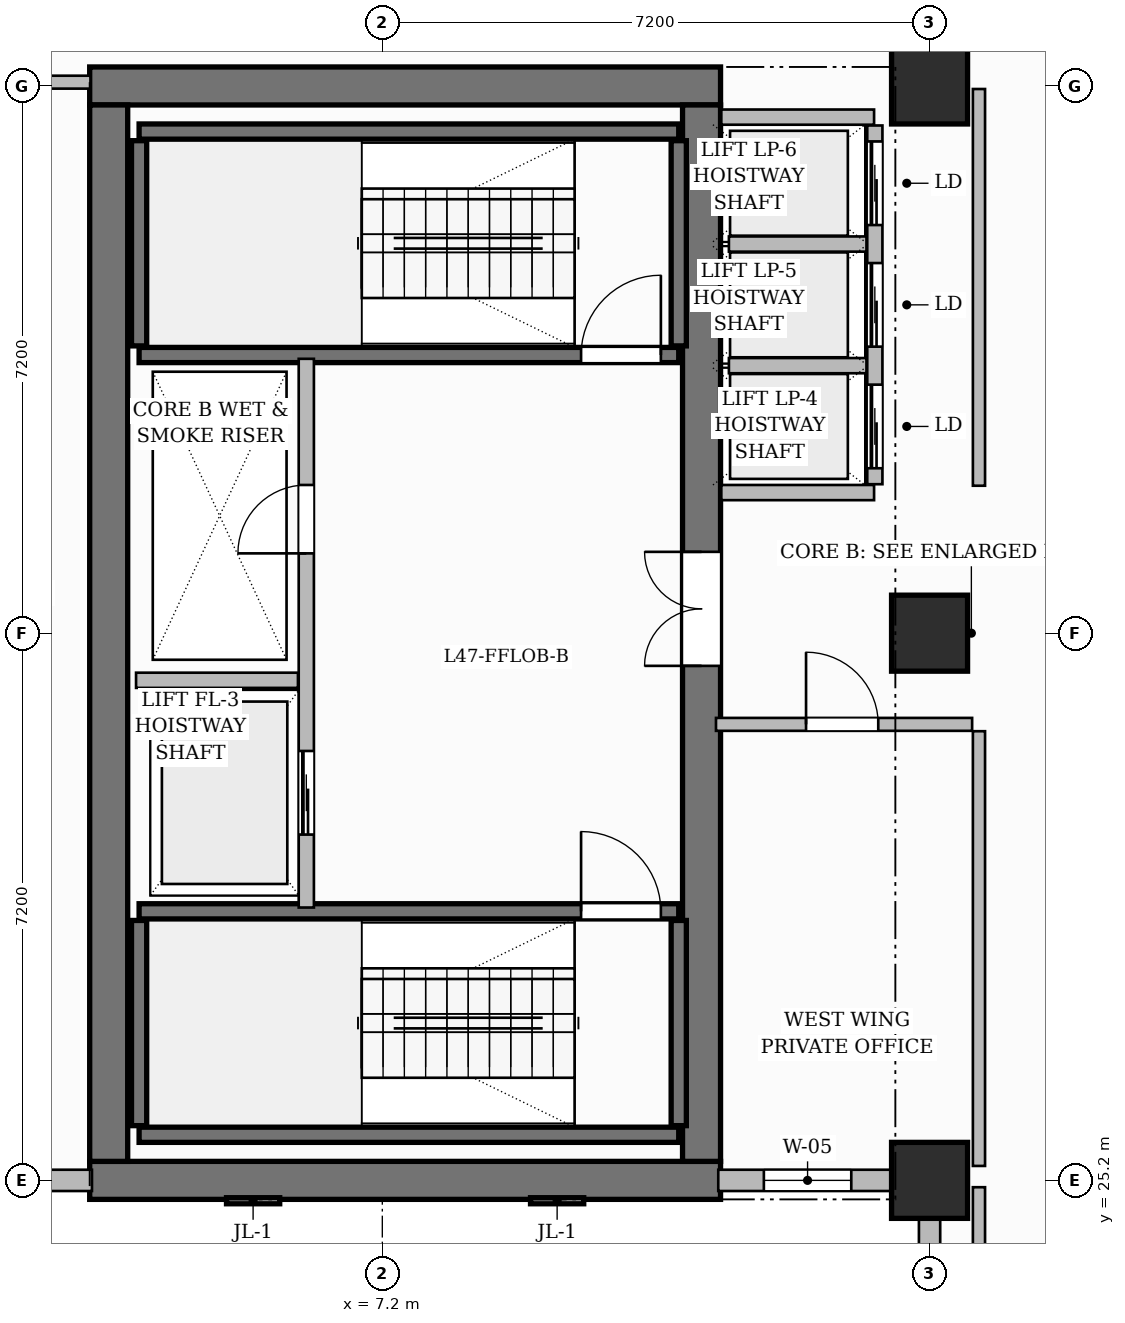
"""IFC4 building model, lengths in metres.
Left out: names, types, materials, properties, quantities, classifications, styles, units other than length and angle.
Written with IfcOpenShell. Run it as: python <this file> out.ifc"""

import sys

from ifc_helpers import new_model, si_unit, direction, frame, frame_2d, origin, origin_2d, place, context, subcontext, project, spatial, rectangle, extrude, source, transform, mapped, element, fill, save


model = new_model("IFC4")
c1 = context("Model", 3, precision=1e-05, world=origin(), true_north=direction((0.0, 1.0)))
c2 = subcontext(c1, "Body", "Model", "MODEL_VIEW")
j1 = project(units=[si_unit("LENGTHUNIT", "METRE"), si_unit("PLANEANGLEUNIT", "RADIAN")], contexts=[c1])
p1 = place(None, origin())
s1 = spatial("IfcSite", under=j1, at=p1, CompositionType="ELEMENT")
p2 = place(p1, origin())
s2 = spatial("IfcBuilding", under=s1, at=p2, CompositionType="ELEMENT")
p3 = place(p2, frame((0.0, 0.0, 188.8)))
s3 = spatial("IfcBuildingStorey", under=s2, at=p3, CompositionType="ELEMENT", Elevation=188.8)
for number, where, z_axis, x_axis in (
    (1, (3.35, 25.2, 0.0), (0.0, 0.0, 1.0), (1.0, 0.0, 0.0)),
    (2, (3.35, 39.6, 0.0), (0.0, 0.0, 1.0), (1.0, 0.0, 0.0)),
):
    element("IfcWall", number, at=place(p3, frame(where, z_axis=z_axis, x_axis=x_axis)), inside=s3, PredefinedType="SHEAR", context=c2, shape_type="SweptSolid", body=[
        extrude(rectangle(XDim=8.3, YDim=0.5, at=frame_2d((4.15, 0.0))), origin(), (0.0, 0.0, 1.0), 3.85),
    ])
p4 = place(p3, frame((3.6, 25.45, 0.0), z_axis=(0.0, 0.0, 1.0), x_axis=(0.0, 1.0, 0.0)))
e3 = element("IfcWall", 3, at=p4, inside=s3, PredefinedType="SHEAR", context=c2, shape_type="SweptSolid", body=[
    extrude(rectangle(XDim=13.9, YDim=0.5, at=frame_2d((6.95, 0.0))), origin(), (0.0, 0.0, 1.0), 3.85),
])
p5 = place(p3, frame((11.4, 25.45, 0.0), z_axis=(0.0, 0.0, 1.0), x_axis=(0.0, 1.0, 0.0)))
e4 = element("IfcWall", 4, at=p5, inside=s3, PredefinedType="SHEAR", context=c2, shape_type="SweptSolid", body=[
    extrude(rectangle(XDim=13.9, YDim=0.5, at=frame_2d((6.95, 0.0))), origin(), (0.0, 0.0, 1.0), 3.85),
])
p6 = place(p5, frame((6.52, 0.0, 0.0)))
e5 = element("IfcOpeningElement", 5, at=p6, cuts=e4, PredefinedType="OPENING", context=c2, shape_type="SweptSolid", body=[
    extrude(rectangle(XDim=1.5, YDim=2.2, at=frame_2d((0.75, 1.1))), frame((0.0, 0.26, 0.0), z_axis=(0.0, -1.0, 0.0), x_axis=(1.0, 0.0, 0.0)), (0.0, 0.0, 1.0), 0.52),
])
m1 = source(origin(), c2, "Body", "SweptSolid", [
    extrude(rectangle(XDim=1.0, YDim=1.0, at=origin_2d()), origin(), (0.0, 0.0, 1.0), 3.85),
])
for number, where, z_axis, x_axis in (
    (6, (14.4, 25.2, 0.0), (0.0, 0.0, 1.0), (1.0, 0.0, 0.0)),
    (7, (14.4, 32.4, 0.0), (0.0, 0.0, 1.0), (1.0, 0.0, 0.0)),
    (8, (14.4, 39.6, 0.0), (0.0, 0.0, 1.0), (1.0, 0.0, 0.0)),
):
    element("IfcColumn", number, at=place(p3, frame(where, z_axis=z_axis, x_axis=x_axis)), inside=s3, PredefinedType="COLUMN", context=c2, shape_type="MappedRepresentation", body=[
        mapped(m1, transform((0.0, 0.0, 0.0), scale=1.0)),
    ])
p7 = place(p3, frame((4.0, 25.8, 0.0), z_axis=(0.0, 0.0, 1.0), x_axis=(1.0, 0.0, 0.0)))
e9 = element("IfcWall", 9, at=p7, inside=s3, PredefinedType="SHEAR", context=c2, shape_type="SweptSolid", body=[
    extrude(rectangle(XDim=7.1, YDim=0.2, at=frame_2d((3.55, 0.0))), origin(), (0.0, 0.0, 1.0), 3.85),
])
for number, where, z_axis, x_axis in (
    (10, (4.0, 25.92, 0.0), (0.0, 0.0, 1.0), (0.0, 1.0, 0.0)),
    (11, (11.1, 25.92, 0.0), (0.0, 0.0, 1.0), (0.0, 1.0, 0.0)),
):
    element("IfcWall", number, at=place(p3, frame(where, z_axis=z_axis, x_axis=x_axis)), inside=s3, PredefinedType="SHEAR", context=c2, shape_type="SweptSolid", body=[
        extrude(rectangle(XDim=2.7, YDim=0.2, at=frame_2d((1.35, 0.0))), origin(), (0.0, 0.0, 1.0), 3.85),
    ])
p8 = place(p3, frame((4.0, 28.74, 0.0), z_axis=(0.0, 0.0, 1.0), x_axis=(1.0, 0.0, 0.0)))
e12 = element("IfcWall", 12, at=p8, inside=s3, PredefinedType="SHEAR", context=c2, shape_type="SweptSolid", body=[
    extrude(rectangle(XDim=7.1, YDim=0.2, at=frame_2d((3.55, 0.0))), origin(), (0.0, 0.0, 1.0), 3.85),
])
p9 = place(p8, frame((5.815, 0.0, 0.0)))
e13 = element("IfcOpeningElement", 13, at=p9, cuts=e12, PredefinedType="OPENING", context=c2, shape_type="SweptSolid", body=[
    extrude(rectangle(XDim=1.05, YDim=2.2, at=frame_2d((0.525, 1.1))), frame((0.0, 0.11, 0.0), z_axis=(0.0, -1.0, 0.0), x_axis=(1.0, 0.0, 0.0)), (0.0, 0.0, 1.0), 0.22),
])
p10 = place(p3, frame((4.0, 39.0, 0.0), z_axis=(0.0, 0.0, 1.0), x_axis=(1.0, 0.0, 0.0)))
e14 = element("IfcWall", 14, at=p10, inside=s3, PredefinedType="SHEAR", context=c2, shape_type="SweptSolid", body=[
    extrude(rectangle(XDim=7.1, YDim=0.2, at=frame_2d((3.55, 0.0))), origin(), (0.0, 0.0, 1.0), 3.85),
])
for number, where, z_axis, x_axis in (
    (15, (4.0, 36.18, 0.0), (0.0, 0.0, 1.0), (0.0, 1.0, 0.0)),
    (16, (11.1, 36.18, 0.0), (0.0, 0.0, 1.0), (0.0, 1.0, 0.0)),
):
    element("IfcWall", number, at=place(p3, frame(where, z_axis=z_axis, x_axis=x_axis)), inside=s3, PredefinedType="SHEAR", context=c2, shape_type="SweptSolid", body=[
        extrude(rectangle(XDim=2.7, YDim=0.2, at=frame_2d((1.35, 0.0))), origin(), (0.0, 0.0, 1.0), 3.85),
    ])
p11 = place(p3, frame((4.0, 36.06, 0.0), z_axis=(0.0, 0.0, 1.0), x_axis=(1.0, 0.0, 0.0)))
e17 = element("IfcWall", 17, at=p11, inside=s3, PredefinedType="SHEAR", context=c2, shape_type="SweptSolid", body=[
    extrude(rectangle(XDim=7.1, YDim=0.2, at=frame_2d((3.55, 0.0))), origin(), (0.0, 0.0, 1.0), 3.85),
])
p12 = place(p11, frame((5.815, 0.0, 0.0)))
e18 = element("IfcOpeningElement", 18, at=p12, cuts=e17, PredefinedType="OPENING", context=c2, shape_type="SweptSolid", body=[
    extrude(rectangle(XDim=1.05, YDim=2.2, at=frame_2d((0.525, 1.1))), frame((0.0, 0.11, 0.0), z_axis=(0.0, -1.0, 0.0), x_axis=(1.0, 0.0, 0.0)), (0.0, 0.0, 1.0), 0.22),
])
p13 = place(p3, frame((6.2, 28.79, 0.0), z_axis=(0.0, 0.0, 1.0), x_axis=(0.0, 1.0, 0.0)))
e19 = element("IfcWall", 19, at=p13, inside=s3, PredefinedType="PARTITIONING", context=c2, shape_type="SweptSolid", body=[
    extrude(rectangle(XDim=7.22, YDim=0.2, at=frame_2d((3.61, 0.0))), origin(), (0.0, 0.0, 1.0), 3.6),
])
p14 = place(p13, frame((4.66, 0.0, 0.0)))
e20 = element("IfcOpeningElement", 20, at=p14, cuts=e19, PredefinedType="OPENING", context=c2, shape_type="SweptSolid", body=[
    extrude(rectangle(XDim=0.9, YDim=2.1, at=frame_2d((0.45, 1.05))), frame((0.0, 0.11, 0.0), z_axis=(0.0, -1.0, 0.0), x_axis=(1.0, 0.0, 0.0)), (0.0, 0.0, 1.0), 0.22),
])
p15 = place(p13, frame((0.96, 0.0, 0.0)))
e21 = element("IfcOpeningElement", 21, at=p15, cuts=e19, PredefinedType="OPENING", context=c2, shape_type="SweptSolid", body=[
    extrude(rectangle(XDim=1.1, YDim=2.2, at=frame_2d((0.55, 1.1))), frame((0.0, 0.11, 0.0), z_axis=(0.0, -1.0, 0.0), x_axis=(1.0, 0.0, 0.0)), (0.0, 0.0, 1.0), 0.22),
])
p16 = place(p3, frame((3.96, 31.78, 0.0), z_axis=(0.0, 0.0, 1.0), x_axis=(1.0, 0.0, 0.0)))
e22 = element("IfcWall", 22, at=p16, inside=s3, PredefinedType="PARTITIONING", context=c2, shape_type="SweptSolid", body=[
    extrude(rectangle(XDim=2.13, YDim=0.2, at=frame_2d((1.065, 0.0))), origin(), (0.0, 0.0, 1.0), 3.6),
])
for number, where, z_axis, x_axis in (
    (23, (11.66, 34.25, 0.0), (0.0, 0.0, 1.0), (1.0, 0.0, 0.0)),
    (24, (11.66, 39.19, 0.0), (0.0, 0.0, 1.0), (1.0, 0.0, 0.0)),
):
    element("IfcWall", number, at=place(p3, frame(where, z_axis=z_axis, x_axis=x_axis)), inside=s3, PredefinedType="PARTITIONING", context=c2, shape_type="SweptSolid", body=[
        extrude(rectangle(XDim=2.01, YDim=0.2, at=frame_2d((1.005, 0.0))), origin(), (0.0, 0.0, 1.0), 3.6),
    ])
p17 = place(p3, frame((13.68, 34.36, 0.0), z_axis=(0.0, 0.0, 1.0), x_axis=(0.0, 1.0, 0.0)))
e25 = element("IfcWall", 25, at=p17, inside=s3, PredefinedType="PARTITIONING", context=c2, shape_type="SweptSolid", body=[
    extrude(rectangle(XDim=4.72, YDim=0.2, at=frame_2d((2.36, 0.0))), origin(), (0.0, 0.0, 1.0), 3.6),
])
p18 = place(p17, frame((0.21, 0.0, 0.0)))
e26 = element("IfcOpeningElement", 26, at=p18, cuts=e25, PredefinedType="OPENING", context=c2, shape_type="SweptSolid", body=[
    extrude(rectangle(XDim=1.1, YDim=2.2, at=frame_2d((0.55, 1.1))), frame((0.0, 0.11, 0.0), z_axis=(0.0, -1.0, 0.0), x_axis=(1.0, 0.0, 0.0)), (0.0, 0.0, 1.0), 0.22),
])
p19 = place(p17, frame((1.81, 0.0, 0.0)))
e27 = element("IfcOpeningElement", 27, at=p19, cuts=e25, PredefinedType="OPENING", context=c2, shape_type="SweptSolid", body=[
    extrude(rectangle(XDim=1.1, YDim=2.2, at=frame_2d((0.55, 1.1))), frame((0.0, 0.11, 0.0), z_axis=(0.0, -1.0, 0.0), x_axis=(1.0, 0.0, 0.0)), (0.0, 0.0, 1.0), 0.22),
])
p20 = place(p17, frame((3.41, 0.0, 0.0)))
e28 = element("IfcOpeningElement", 28, at=p20, cuts=e25, PredefinedType="OPENING", context=c2, shape_type="SweptSolid", body=[
    extrude(rectangle(XDim=1.1, YDim=2.2, at=frame_2d((0.55, 1.1))), frame((0.0, 0.11, 0.0), z_axis=(0.0, -1.0, 0.0), x_axis=(1.0, 0.0, 0.0)), (0.0, 0.0, 1.0), 0.22),
])
for number, where, z_axis, x_axis in (
    (29, (11.76, 35.92, 0.0), (0.0, 0.0, 1.0), (1.0, 0.0, 0.0)),
    (30, (11.76, 37.52, 0.0), (0.0, 0.0, 1.0), (1.0, 0.0, 0.0)),
):
    element("IfcWall", number, at=place(p3, frame(where, z_axis=z_axis, x_axis=x_axis)), inside=s3, PredefinedType="PARTITIONING", context=c2, shape_type="SweptSolid", body=[
        extrude(rectangle(XDim=1.81, YDim=0.2, at=frame_2d((0.905, 0.0))), origin(), (0.0, 0.0, 1.0), 3.6),
    ])
p21 = place(p3, frame((15.05, 11.56, 0.0), z_axis=(0.0, 0.0, 1.0), x_axis=(0.0, 1.0, 0.0)))
e31 = element("IfcWall", 31, at=p21, inside=s3, PredefinedType="PARTITIONING", context=c2, shape_type="SweptSolid", body=[
    extrude(rectangle(XDim=13.55, YDim=0.16, at=frame_2d((6.775, 0.0))), origin(), (0.0, 0.0, 1.0), 3.6),
])
p22 = place(p3, frame((0.24, 39.65, 0.0), z_axis=(0.0, 0.0, 1.0), x_axis=(1.0, 0.0, 0.0)))
e32 = element("IfcWall", 32, at=p22, inside=s3, PredefinedType="PARTITIONING", context=c2, shape_type="SweptSolid", body=[
    extrude(rectangle(XDim=3.12, YDim=0.17, at=frame_2d((1.56, 0.0))), origin(), (0.0, 0.0, 1.0), 3.6),
])
p23 = place(p22, frame((1.11, 0.0, 0.0)))
e33 = element("IfcOpeningElement", 33, at=p23, cuts=e32, PredefinedType="OPENING", context=c2, shape_type="SweptSolid", body=[
    extrude(rectangle(XDim=0.9, YDim=2.15, at=frame_2d((0.45, 1.075))), frame((0.0, 0.095, 0.0), z_axis=(0.0, -1.0, 0.0), x_axis=(1.0, 0.0, 0.0)), (0.0, 0.0, 1.0), 0.19),
])
p24 = place(p3, frame((15.05, 34.34, 0.0), z_axis=(0.0, 0.0, 1.0), x_axis=(0.0, 1.0, 0.0)))
e34 = element("IfcWall", 34, at=p24, inside=s3, PredefinedType="PARTITIONING", context=c2, shape_type="SweptSolid", body=[
    extrude(rectangle(XDim=5.22, YDim=0.16, at=frame_2d((2.61, 0.0))), origin(), (0.0, 0.0, 1.0), 3.6),
])
p25 = place(p3, frame((15.05, 25.39, 0.0), z_axis=(0.0, 0.0, 1.0), x_axis=(0.0, 1.0, 0.0)))
e35 = element("IfcWall", 35, at=p25, inside=s3, PredefinedType="PARTITIONING", context=c2, shape_type="SweptSolid", body=[
    extrude(rectangle(XDim=5.72, YDim=0.16, at=frame_2d((2.86, 0.0))), origin(), (0.0, 0.0, 1.0), 3.6),
])
p26 = place(p3, frame((11.59, 31.2, 0.0), z_axis=(0.0, 0.0, 1.0), x_axis=(1.0, 0.0, 0.0)))
e36 = element("IfcWall", 36, at=p26, inside=s3, PredefinedType="PARTITIONING", context=c2, shape_type="SweptSolid", body=[
    extrude(rectangle(XDim=3.37, YDim=0.17, at=frame_2d((1.685, 0.0))), origin(), (0.0, 0.0, 1.0), 3.6),
])
p27 = place(p26, frame((1.185, 0.0, 0.0)))
e37 = element("IfcOpeningElement", 37, at=p27, cuts=e36, PredefinedType="OPENING", context=c2, shape_type="SweptSolid", body=[
    extrude(rectangle(XDim=0.95, YDim=2.15, at=frame_2d((0.475, 1.075))), frame((0.0, 0.095, 0.0), z_axis=(0.0, -1.0, 0.0), x_axis=(1.0, 0.0, 0.0)), (0.0, 0.0, 1.0), 0.19),
])
p28 = place(p3, frame((14.4, 0.05, 0.0), z_axis=(0.0, 0.0, 1.0), x_axis=(0.0, 1.0, 0.0)))
e38 = element("IfcWall", 38, at=p28, inside=s3, PredefinedType="SOLIDWALL", context=c2, shape_type="SweptSolid", body=[
    extrude(rectangle(XDim=25.1, YDim=0.28, at=frame_2d((12.55, 0.0))), origin(), (0.0, 0.0, 1.0), 3.085),
])
p29 = place(p28, frame((2.75, 0.0, 0.0)))
e39 = element("IfcOpeningElement", 39, at=p29, cuts=e38, PredefinedType="OPENING", context=c2, shape_type="SweptSolid", body=[
    extrude(rectangle(XDim=1.2, YDim=2.2, at=frame_2d((0.6, 1.1))), frame((0.0, 0.15, 0.0), z_axis=(0.0, -1.0, 0.0), x_axis=(1.0, 0.0, 0.0)), (0.0, 0.0, 1.0), 0.3),
])
p30 = place(p28, frame((1.025, 0.0, 0.8)))
e40 = element("IfcOpeningElement", 40, at=p30, cuts=e38, PredefinedType="OPENING", context=c2, shape_type="SweptSolid", body=[
    extrude(rectangle(XDim=1.15, YDim=1.8, at=frame_2d((0.575, 0.9))), frame((0.0, 0.15, 0.0), z_axis=(0.0, -1.0, 0.0), x_axis=(1.0, 0.0, 0.0)), (0.0, 0.0, 1.0), 0.3),
])
p31 = place(p28, frame((4.6, 0.0, 0.8)))
e41 = element("IfcOpeningElement", 41, at=p31, cuts=e38, PredefinedType="OPENING", context=c2, shape_type="SweptSolid", body=[
    extrude(rectangle(XDim=1.4, YDim=1.85, at=frame_2d((0.7, 0.925))), frame((0.0, 0.15, 0.0), z_axis=(0.0, -1.0, 0.0), x_axis=(1.0, 0.0, 0.0)), (0.0, 0.0, 1.0), 0.3),
])
p32 = place(p28, frame((8.246, 0.0, 0.8)))
e42 = element("IfcOpeningElement", 42, at=p32, cuts=e38, PredefinedType="OPENING", context=c2, shape_type="SweptSolid", body=[
    extrude(rectangle(XDim=0.95, YDim=1.75, at=frame_2d((0.475, 0.875))), frame((0.0, 0.15, 0.0), z_axis=(0.0, -1.0, 0.0), x_axis=(1.0, 0.0, 0.0)), (0.0, 0.0, 1.0), 0.3),
])
p33 = place(p28, frame((9.885, 0.0, 0.8)))
e43 = element("IfcOpeningElement", 43, at=p33, cuts=e38, PredefinedType="OPENING", context=c2, shape_type="SweptSolid", body=[
    extrude(rectangle(XDim=1.15, YDim=1.8, at=frame_2d((0.575, 0.9))), frame((0.0, 0.15, 0.0), z_axis=(0.0, -1.0, 0.0), x_axis=(1.0, 0.0, 0.0)), (0.0, 0.0, 1.0), 0.3),
])
p34 = place(p28, frame((11.789, 0.0, 0.8)))
e44 = element("IfcOpeningElement", 44, at=p34, cuts=e38, PredefinedType="OPENING", context=c2, shape_type="SweptSolid", body=[
    extrude(rectangle(XDim=1.4, YDim=1.85, at=frame_2d((0.7, 0.925))), frame((0.0, 0.15, 0.0), z_axis=(0.0, -1.0, 0.0), x_axis=(1.0, 0.0, 0.0)), (0.0, 0.0, 1.0), 0.3),
])
p35 = place(p28, frame((15.675, 0.0, 0.8)))
e45 = element("IfcOpeningElement", 45, at=p35, cuts=e38, PredefinedType="OPENING", context=c2, shape_type="SweptSolid", body=[
    extrude(rectangle(XDim=1.8, YDim=1.85, at=frame_2d((0.9, 0.925))), frame((0.0, 0.15, 0.0), z_axis=(0.0, -1.0, 0.0), x_axis=(1.0, 0.0, 0.0)), (0.0, 0.0, 1.0), 0.3),
])
p36 = place(p28, frame((18.425, 0.0, 0.8)))
e46 = element("IfcOpeningElement", 46, at=p36, cuts=e38, PredefinedType="OPENING", context=c2, shape_type="SweptSolid", body=[
    extrude(rectangle(XDim=1.8, YDim=1.85, at=frame_2d((0.9, 0.925))), frame((0.0, 0.15, 0.0), z_axis=(0.0, -1.0, 0.0), x_axis=(1.0, 0.0, 0.0)), (0.0, 0.0, 1.0), 0.3),
])
p37 = place(p28, frame((22.65, 0.0, 0.8)))
e47 = element("IfcOpeningElement", 47, at=p37, cuts=e38, PredefinedType="OPENING", context=c2, shape_type="SweptSolid", body=[
    extrude(rectangle(XDim=1.4, YDim=1.85, at=frame_2d((0.7, 0.925))), frame((0.0, 0.15, 0.0), z_axis=(0.0, -1.0, 0.0), x_axis=(1.0, 0.0, 0.0)), (0.0, 0.0, 1.0), 0.3),
])
p38 = place(p3, frame((11.62, 25.2, 0.0), z_axis=(0.0, 0.0, 1.0), x_axis=(1.0, 0.0, 0.0)))
e48 = element("IfcWall", 48, at=p38, inside=s3, PredefinedType="SOLIDWALL", context=c2, shape_type="SweptSolid", body=[
    extrude(rectangle(XDim=2.78, YDim=0.28, at=frame_2d((1.39, 0.0))), origin(), (0.0, 0.0, 1.0), 3.085),
])
p39 = place(p38, frame((0.6, 0.0, 0.8)))
e49 = element("IfcOpeningElement", 49, at=p39, cuts=e48, PredefinedType="OPENING", context=c2, shape_type="SweptSolid", body=[
    extrude(rectangle(XDim=1.15, YDim=1.8, at=frame_2d((0.575, 0.9))), frame((0.0, 0.15, 0.0), z_axis=(0.0, -1.0, 0.0), x_axis=(1.0, 0.0, 0.0)), (0.0, 0.0, 1.0), 0.3),
])
p40 = place(p3, frame((0.0, 25.2, 0.0), z_axis=(0.0, 0.0, 1.0), x_axis=(1.0, 0.0, 0.0)))
e50 = element("IfcWall", 50, at=p40, inside=s3, PredefinedType="SOLIDWALL", context=c2, shape_type="SweptSolid", body=[
    extrude(rectangle(XDim=3.38, YDim=0.28, at=frame_2d((1.69, 0.0))), origin(), (0.0, 0.0, 1.0), 3.6),
])
p41 = place(p40, frame((1.205, 0.0, 0.8)))
e51 = element("IfcOpeningElement", 51, at=p41, cuts=e50, PredefinedType="OPENING", context=c2, shape_type="SweptSolid", body=[
    extrude(rectangle(XDim=1.4, YDim=1.85, at=frame_2d((0.7, 0.925))), frame((0.0, 0.15, 0.0), z_axis=(0.0, -1.0, 0.0), x_axis=(1.0, 0.0, 0.0)), (0.0, 0.0, 1.0), 0.3),
])
m2 = source(origin(), c2, "Body", "SweptSolid", [
    extrude(rectangle(XDim=1.05, YDim=2.2, at=frame_2d((0.525, 1.1))), frame((0.0, 0.025, 0.0), z_axis=(0.0, -1.0, 0.0), x_axis=(1.0, 0.0, 0.0)), (0.0, 0.0, 1.0), 0.05),
])
p42 = place(p9, origin())
e52 = element("IfcDoor", 52, at=p42, inside=s3, OperationType="SINGLE_SWING_LEFT", PredefinedType="DOOR", context=c2, shape_type="MappedRepresentation", body=[
    mapped(m2, transform((0.0, 0.0, 0.0), scale=1.0)),
])
fill(e13, e52)
p43 = place(p12, origin())
e53 = element("IfcDoor", 53, at=p43, inside=s3, OperationType="SINGLE_SWING_RIGHT", PredefinedType="DOOR", context=c2, shape_type="MappedRepresentation", body=[
    mapped(m2, transform((0.0, 0.0, 0.0), scale=1.0)),
])
fill(e18, e53)
m3 = source(origin(), c2, "Body", "SweptSolid", [
    extrude(rectangle(XDim=0.9, YDim=2.1, at=frame_2d((0.45, 1.05))), frame((0.0, 0.025, 0.0), z_axis=(0.0, -1.0, 0.0), x_axis=(1.0, 0.0, 0.0)), (0.0, 0.0, 1.0), 0.05),
])
p44 = place(p14, origin())
e54 = element("IfcDoor", 54, at=p44, inside=s3, OperationType="SINGLE_SWING_LEFT", PredefinedType="DOOR", context=c2, shape_type="MappedRepresentation", body=[
    mapped(m3, transform((0.0, 0.0, 0.0), scale=1.0)),
])
fill(e20, e54)
m4 = source(origin(), c2, "Body", "SweptSolid", [
    extrude(rectangle(XDim=1.5, YDim=2.2, at=frame_2d((0.75, 1.1))), frame((0.0, 0.025, 0.0), z_axis=(0.0, -1.0, 0.0), x_axis=(1.0, 0.0, 0.0)), (0.0, 0.0, 1.0), 0.05),
])
p45 = place(p6, origin())
e55 = element("IfcDoor", 55, at=p45, inside=s3, OperationType="DOUBLE_DOOR_SINGLE_SWING", PredefinedType="DOOR", context=c2, shape_type="MappedRepresentation", body=[
    mapped(m4, transform((0.0, 0.0, 0.0), scale=1.0)),
])
fill(e5, e55)
m5 = source(origin(), c2, "Body", "SweptSolid", [
    extrude(rectangle(XDim=0.95, YDim=2.15, at=frame_2d((0.475, 1.075))), frame((0.0, 0.025, 0.0), z_axis=(0.0, -1.0, 0.0), x_axis=(1.0, 0.0, 0.0)), (0.0, 0.0, 1.0), 0.05),
])
p46 = place(p27, origin())
e56 = element("IfcDoor", 56, at=p46, inside=s3, OperationType="SINGLE_SWING_LEFT", PredefinedType="DOOR", context=c2, shape_type="MappedRepresentation", body=[
    mapped(m5, transform((0.0, 0.0, 0.0), scale=1.0)),
])
fill(e37, e56)
m6 = source(origin(), c2, "Body", "SweptSolid", [
    extrude(rectangle(XDim=1.1, YDim=2.2, at=frame_2d((0.55, 1.1))), frame((0.0, 0.025, 0.0), z_axis=(0.0, -1.0, 0.0), x_axis=(1.0, 0.0, 0.0)), (0.0, 0.0, 1.0), 0.05),
])
p47 = place(p15, origin())
e57 = element("IfcDoor", 57, at=p47, inside=s3, OperationType="SLIDING_TO_LEFT", PredefinedType="DOOR", context=c2, shape_type="MappedRepresentation", body=[
    mapped(m6, transform((0.0, 0.0, 0.0), scale=1.0)),
])
fill(e21, e57)
p48 = place(p18, origin())
e58 = element("IfcDoor", 58, at=p48, inside=s3, OperationType="SLIDING_TO_LEFT", PredefinedType="DOOR", context=c2, shape_type="MappedRepresentation", body=[
    mapped(m6, transform((0.0, 0.0, 0.0), scale=1.0)),
])
fill(e26, e58)
p49 = place(p19, origin())
e59 = element("IfcDoor", 59, at=p49, inside=s3, OperationType="SLIDING_TO_LEFT", PredefinedType="DOOR", context=c2, shape_type="MappedRepresentation", body=[
    mapped(m6, transform((0.0, 0.0, 0.0), scale=1.0)),
])
fill(e27, e59)
p50 = place(p20, origin())
e60 = element("IfcDoor", 60, at=p50, inside=s3, OperationType="SLIDING_TO_LEFT", PredefinedType="DOOR", context=c2, shape_type="MappedRepresentation", body=[
    mapped(m6, transform((0.0, 0.0, 0.0), scale=1.0)),
])
fill(e28, e60)
m7 = source(origin(), c2, "Body", "SweptSolid", [
    extrude(rectangle(XDim=1.15, YDim=1.8, at=frame_2d((0.575, 0.9))), frame((0.0, 0.03, 0.0), z_axis=(0.0, -1.0, 0.0), x_axis=(1.0, 0.0, 0.0)), (0.0, 0.0, 1.0), 0.06),
])
p51 = place(p39, origin())
e61 = element("IfcWindow", 61, at=p51, inside=s3, PartitioningType="SINGLE_PANEL", PredefinedType="WINDOW", context=c2, shape_type="MappedRepresentation", body=[
    mapped(m7, transform((0.0, 0.0, 0.0), scale=1.0)),
])
fill(e49, e61)
save(model, sys.argv[1])
